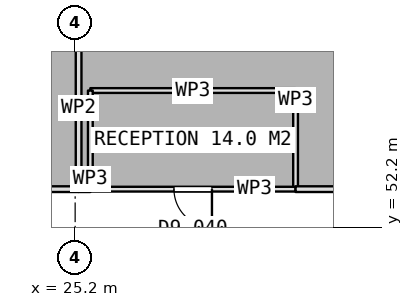
"""IFC4 building model, lengths in metres.
Left out: names, types, materials, properties, quantities, classifications, styles, units other than length and angle.
Written with IfcOpenShell. Run it as: python <this file> out.ifc"""

import sys

from ifc_helpers import new_model, si_unit, direction, frame, frame_2d, origin, place, context, subcontext, project, spatial, rectangle, extrude, element, fill, save


model = new_model("IFC4")
c1 = context("Model", 3, precision=1e-05, world=origin(), true_north=direction((0.0, 1.0)))
c2 = subcontext(c1, "Body", "Model", "MODEL_VIEW")
j1 = project(units=[si_unit("LENGTHUNIT", "METRE"), si_unit("PLANEANGLEUNIT", "RADIAN")], contexts=[c1])
p1 = place(None, origin())
s1 = spatial("IfcSite", under=j1, at=p1, CompositionType="ELEMENT")
p2 = place(p1, origin())
s2 = spatial("IfcBuilding", under=s1, at=p2, CompositionType="ELEMENT")
p3 = place(p2, frame((0.0, 0.0, 29.15)))
s3 = spatial("IfcBuildingStorey", under=s2, at=p3, CompositionType="ELEMENT", Elevation=29.15)
p4 = place(p3, frame((25.6, 55.795, 0.0), z_axis=(0.0, 0.0, 1.0), x_axis=(1.0, 0.0, 0.0)))
e1 = element("IfcWall", 1, at=p4, inside=s3, PredefinedType="PARTITIONING", context=c2, shape_type="SweptSolid", body=[
    extrude(rectangle(XDim=5.4, YDim=0.125, at=frame_2d((2.7, 0.0))), origin(), (0.0, 0.0, 1.0), 3.5),
])
p5 = place(p3, frame((31.0, 55.795, 0.0), z_axis=(0.0, 0.0, 1.0), x_axis=(0.0, -1.0, 0.0)))
e2 = element("IfcWall", 2, at=p5, inside=s3, PredefinedType="PARTITIONING", context=c2, shape_type="SweptSolid", body=[
    extrude(rectangle(XDim=2.595, YDim=0.125, at=frame_2d((1.297, 0.0))), origin(), (0.0, 0.0, 1.0), 3.5),
])
p6 = place(p3, frame((31.0, 53.2, 0.0), z_axis=(0.0, 0.0, 1.0), x_axis=(-1.0, 0.0, 0.0)))
e3 = element("IfcWall", 3, at=p6, inside=s3, PredefinedType="PARTITIONING", context=c2, shape_type="SweptSolid", body=[
    extrude(rectangle(XDim=5.4, YDim=0.125, at=frame_2d((2.7, 0.0))), origin(), (0.0, 0.0, 1.0), 3.5),
])
p7 = place(p6, frame((2.2, 0.0, 0.0)))
e4 = element("IfcOpeningElement", 4, at=p7, cuts=e3, PredefinedType="OPENING", context=c2, shape_type="SweptSolid", body=[
    extrude(rectangle(XDim=1.0, YDim=2.1, at=frame_2d((0.5, 1.05))), frame((0.0, 0.073, 0.0), z_axis=(0.0, -1.0, 0.0), x_axis=(1.0, 0.0, 0.0)), (0.0, 0.0, 1.0), 0.145),
])
p8 = place(p3, frame((25.6, 53.2, 0.0), z_axis=(0.0, 0.0, 1.0), x_axis=(0.0, 1.0, 0.0)))
e5 = element("IfcWall", 5, at=p8, inside=s3, PredefinedType="PARTITIONING", context=c2, shape_type="SweptSolid", body=[
    extrude(rectangle(XDim=2.595, YDim=0.125, at=frame_2d((1.297, 0.0))), origin(), (0.0, 0.0, 1.0), 3.5),
])
p9 = place(p3, frame((36.3, 53.2, 0.0), z_axis=(0.0, 0.0, 1.0), x_axis=(-1.0, 0.0, 0.0)))
e6 = element("IfcWall", 6, at=p9, inside=s3, PredefinedType="PARTITIONING", context=c2, shape_type="SweptSolid", body=[
    extrude(rectangle(XDim=5.3, YDim=0.15, at=frame_2d((2.65, 0.0))), origin(), (0.0, 0.0, 1.0), 3.5),
])
p10 = place(p3, frame((25.6, 53.2, 0.0), z_axis=(0.0, 0.0, 1.0), x_axis=(-1.0, 0.0, 0.0)))
e7 = element("IfcWall", 7, at=p10, inside=s3, PredefinedType="PARTITIONING", context=c2, shape_type="SweptSolid", body=[
    extrude(rectangle(XDim=0.309, YDim=0.15, at=frame_2d((0.155, 0.0))), origin(), (0.0, 0.0, 1.0), 3.5),
])
p11 = place(p3, frame((25.291, 53.2, 0.0), z_axis=(0.0, 0.0, 1.0), x_axis=(0.0, 1.0, 0.0)))
e8 = element("IfcWall", 8, at=p11, inside=s3, PredefinedType="PARTITIONING", context=c2, shape_type="SweptSolid", body=[
    extrude(rectangle(XDim=4.28, YDim=0.15, at=frame_2d((2.14, 0.0))), origin(), (0.0, 0.0, 1.0), 3.5),
])
p12 = place(p3, frame((25.29, 53.2, 0.0), z_axis=(0.0, 0.0, 1.0), x_axis=(-1.0, 0.0, 0.0)))
e9 = element("IfcWall", 9, at=p12, inside=s3, PredefinedType="PARTITIONING", context=c2, shape_type="SweptSolid", body=[
    extrude(rectangle(XDim=2.89, YDim=0.15, at=frame_2d((1.445, 0.0))), origin(), (0.0, 0.0, 1.0), 3.5),
])
p13 = place(p7, origin())
e10 = element("IfcDoor", 10, at=p13, inside=s3, OperationType="SINGLE_SWING_LEFT", PredefinedType="DOOR", context=c2, shape_type="SweptSolid", body=[
    extrude(rectangle(XDim=1.0, YDim=2.1, at=frame_2d((0.5, 1.05))), frame((0.0, 0.025, 0.0), z_axis=(0.0, -1.0, 0.0), x_axis=(1.0, 0.0, 0.0)), (0.0, 0.0, 1.0), 0.05),
])
fill(e4, e10)
save(model, sys.argv[1])
